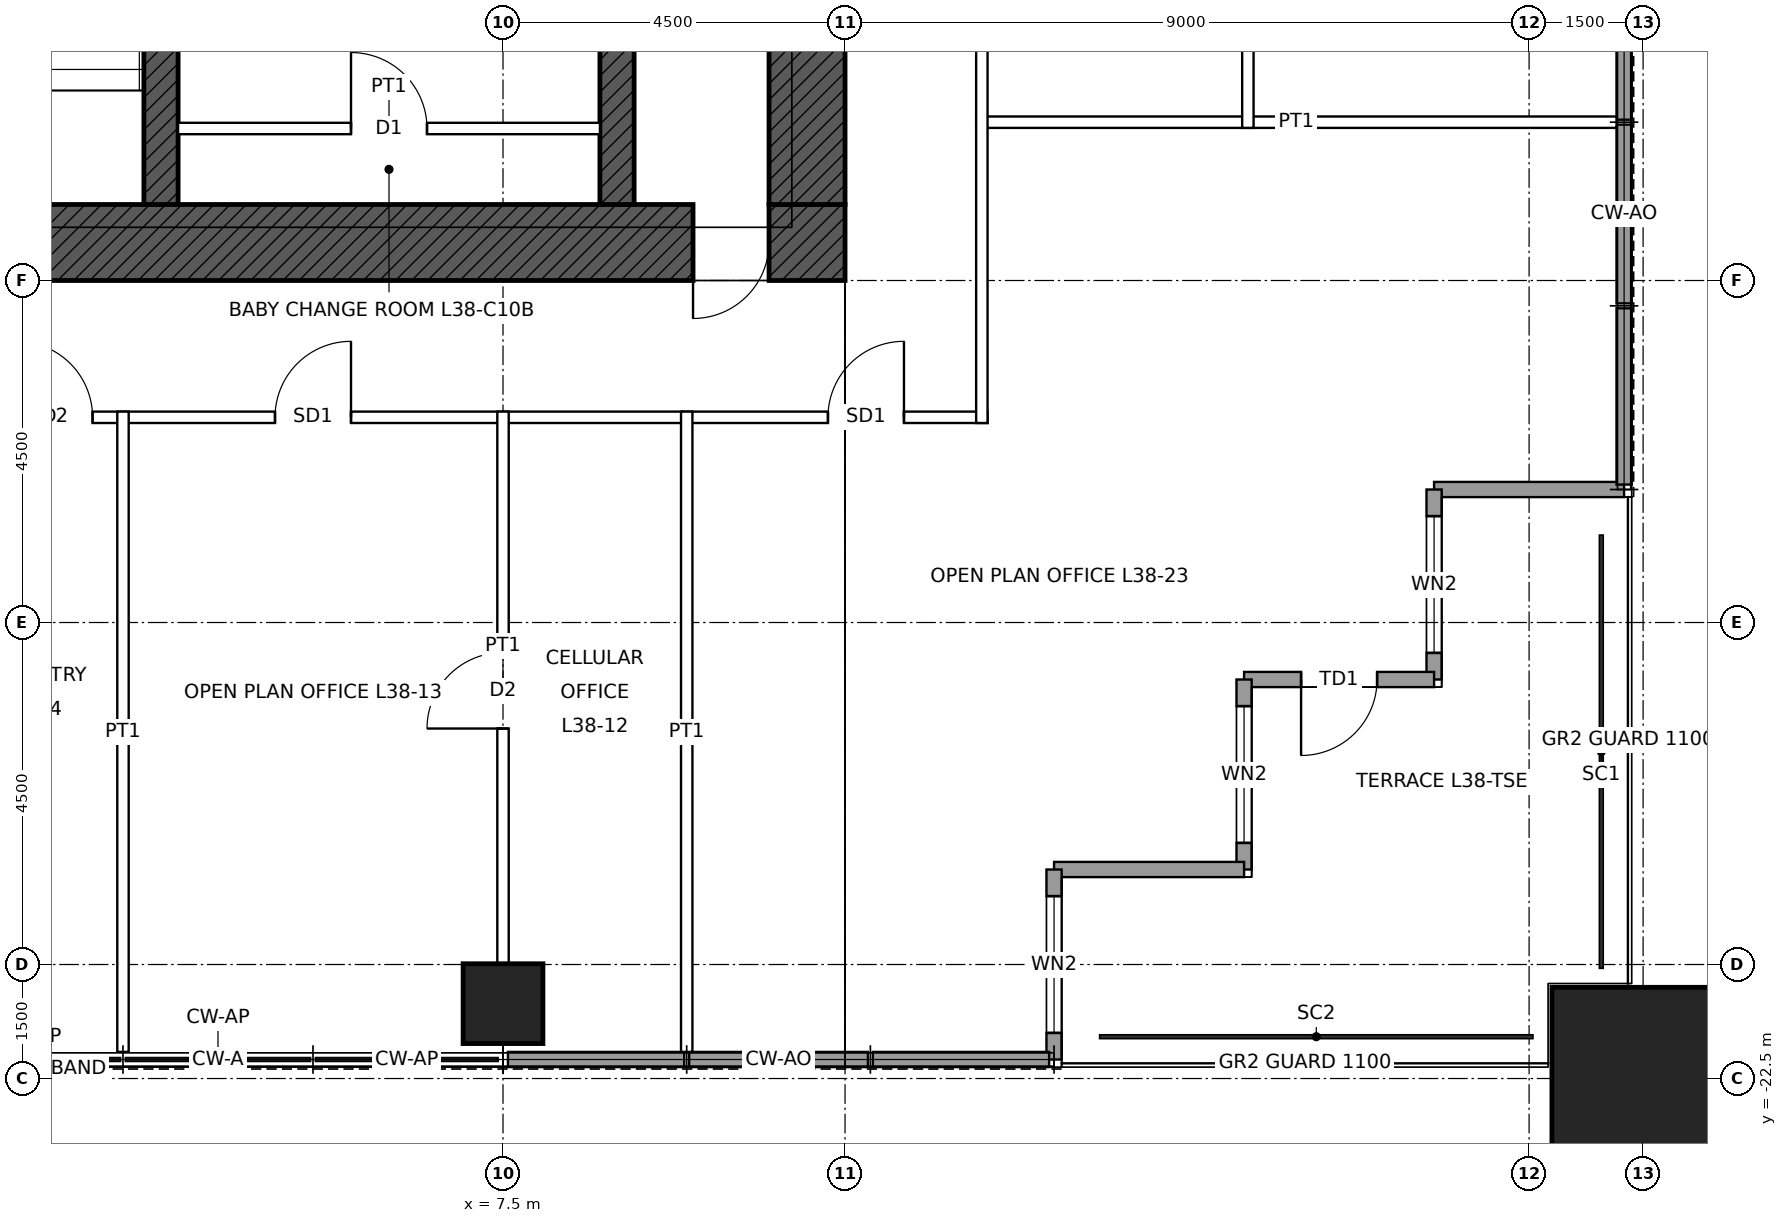
"""IFC4 building model, lengths in metres.
Left out: names, types, materials, properties, quantities, classifications, styles, units other than length and angle.
Written with IfcOpenShell. Run it as: python <this file> out.ifc"""

import sys

from ifc_helpers import new_model, si_unit, direction, frame, frame_2d, origin, origin_2d, place, context, subcontext, project, spatial, rectangle, hollow_rectangle, extrude, element, fill, save


model = new_model("IFC4")
c1 = context("Model", 3, precision=1e-05, world=origin(), true_north=direction((0.0, 1.0)))
c2 = subcontext(c1, "Body", "Model", "MODEL_VIEW")
j1 = project(units=[si_unit("LENGTHUNIT", "METRE"), si_unit("PLANEANGLEUNIT", "RADIAN")], contexts=[c1])
p1 = place(None, origin())
s1 = spatial("IfcSite", under=j1, at=p1, CompositionType="ELEMENT")
p2 = place(p1, origin())
s2 = spatial("IfcBuilding", under=s1, at=p2, CompositionType="ELEMENT")
p3 = place(p2, frame((0.0, 0.0, 185.9)))
s3 = spatial("IfcBuildingStorey", under=s2, at=p3, CompositionType="ELEMENT", Elevation=185.9)
p4 = place(p3, frame((22.5, -22.5, 0.0), z_axis=(0.0, 0.0, 1.0), x_axis=(1.0, 0.0, 0.0)))
e1 = element("IfcColumn", 1, at=p4, inside=s3, PredefinedType="COLUMN", context=c2, shape_type="SweptSolid", body=[
    extrude(hollow_rectangle(XDim=2.4, YDim=2.4, WallThickness=0.12, at=origin_2d()), origin(), (0.0, 0.0, 1.0), 4.0),
])
p5 = place(p3, frame((7.5, -21.515, 0.0), z_axis=(0.0, 0.0, 1.0), x_axis=(1.0, 0.0, 0.0)))
e2 = element("IfcColumn", 2, at=p5, inside=s3, PredefinedType="COLUMN", context=c2, shape_type="SweptSolid", body=[
    extrude(hollow_rectangle(XDim=1.05, YDim=1.05, WallThickness=0.07, at=origin_2d()), origin(), (0.0, 0.0, 1.0), 4.0),
])
p6 = place(p3, frame((12.0, -11.5, 0.0), z_axis=(0.0, 0.0, 1.0), x_axis=(-1.0, 0.0, 0.0)))
e3 = element("IfcWall", 3, at=p6, inside=s3, PredefinedType="SHEAR", context=c2, shape_type="SweptSolid", body=[
    extrude(rectangle(XDim=24.0, YDim=1.0, at=frame_2d((12.0, 0.0))), origin(), (0.0, 0.0, 1.0), 4.0),
])
p7 = place(p6, frame((11.5, 0.0, 0.0)))
e4 = element("IfcOpeningElement", 4, at=p7, cuts=e3, PredefinedType="OPENING", context=c2, shape_type="SweptSolid", body=[
    extrude(rectangle(XDim=1.0, YDim=2.1, at=frame_2d((0.5, 1.05))), frame((0.0, 0.51, 0.0), z_axis=(0.0, -1.0, 0.0), x_axis=(1.0, 0.0, 0.0)), (0.0, 0.0, 1.0), 1.02),
])
p8 = place(p6, frame((1.0, 0.0, 0.0)))
e5 = element("IfcOpeningElement", 5, at=p8, cuts=e3, PredefinedType="OPENING", context=c2, shape_type="SweptSolid", body=[
    extrude(rectangle(XDim=1.0, YDim=2.4, at=frame_2d((0.5, 1.2))), frame((0.0, 0.51, 0.0), z_axis=(0.0, -1.0, 0.0), x_axis=(1.0, 0.0, 0.0)), (0.0, 0.0, 1.0), 1.02),
])
p9 = place(p3, frame((11.5, 11.0, 0.0), z_axis=(0.0, 0.0, 1.0), x_axis=(0.0, -1.0, 0.0)))
e6 = element("IfcWall", 6, at=p9, inside=s3, PredefinedType="SHEAR", context=c2, shape_type="SweptSolid", body=[
    extrude(rectangle(XDim=22.0, YDim=1.0, at=frame_2d((11.0, 0.0))), origin(), (0.0, 0.0, 1.0), 4.0),
])
p10 = place(p9, frame((10.5, 0.0, 0.0)))
e7 = element("IfcOpeningElement", 7, at=p10, cuts=e6, PredefinedType="OPENING", context=c2, shape_type="SweptSolid", body=[
    extrude(rectangle(XDim=1.0, YDim=2.4, at=frame_2d((0.5, 1.2))), frame((0.0, 0.51, 0.0), z_axis=(0.0, -1.0, 0.0), x_axis=(1.0, 0.0, 0.0)), (0.0, 0.0, 1.0), 1.02),
])
p11 = place(p3, frame((9.0, -11.0, 0.0), z_axis=(0.0, 0.0, 1.0), x_axis=(0.0, 1.0, 0.0)))
e8 = element("IfcWall", 8, at=p11, inside=s3, PredefinedType="SHEAR", context=c2, shape_type="SweptSolid", body=[
    extrude(rectangle(XDim=6.5, YDim=0.45, at=frame_2d((3.25, 0.0))), origin(), (0.0, 0.0, 1.0), 4.0),
])
p12 = place(p11, frame((4.25, 0.0, 0.0)))
e9 = element("IfcOpeningElement", 9, at=p12, cuts=e8, PredefinedType="OPENING", context=c2, shape_type="SweptSolid", body=[
    extrude(rectangle(XDim=1.0, YDim=2.1, at=frame_2d((0.5, 1.05))), frame((0.0, 0.235, 0.0), z_axis=(0.0, -1.0, 0.0), x_axis=(1.0, 0.0, 0.0)), (0.0, 0.0, 1.0), 0.47),
])
p13 = place(p3, frame((3.0, -11.0, 0.0), z_axis=(0.0, 0.0, 1.0), x_axis=(0.0, 1.0, 0.0)))
e10 = element("IfcWall", 10, at=p13, inside=s3, PredefinedType="SHEAR", context=c2, shape_type="SweptSolid", body=[
    extrude(rectangle(XDim=6.5, YDim=0.45, at=frame_2d((3.25, 0.0))), origin(), (0.0, 0.0, 1.0), 4.0),
])
p14 = place(p3, frame((22.25, -14.75, 0.0), z_axis=(0.0, 0.0, 1.0), x_axis=(-1.0, 0.0, 0.0)))
e11 = element("IfcWall", 11, at=p14, inside=s3, PredefinedType="SOLIDWALL", context=c2, shape_type="SweptSolid", body=[
    extrude(rectangle(XDim=2.5, YDim=0.2, at=frame_2d((1.25, 0.0))), origin(), (0.0, 0.0, 1.0), 3.85),
])
p15 = place(p3, frame((19.75, -14.75, 0.0), z_axis=(0.0, 0.0, 1.0), x_axis=(0.0, -1.0, 0.0)))
e12 = element("IfcWall", 12, at=p15, inside=s3, PredefinedType="SOLIDWALL", context=c2, shape_type="SweptSolid", body=[
    extrude(rectangle(XDim=2.5, YDim=0.2, at=frame_2d((1.25, 0.0))), origin(), (0.0, 0.0, 1.0), 3.85),
])
p16 = place(p15, frame((0.35, 0.0, 0.3)))
e13 = element("IfcOpeningElement", 13, at=p16, cuts=e12, PredefinedType="OPENING", context=c2, shape_type="SweptSolid", body=[
    extrude(rectangle(XDim=1.8, YDim=2.4, at=frame_2d((0.9, 1.2))), frame((0.0, 0.11, 0.0), z_axis=(0.0, -1.0, 0.0), x_axis=(1.0, 0.0, 0.0)), (0.0, 0.0, 1.0), 0.22),
])
p17 = place(p3, frame((19.75, -17.25, 0.0), z_axis=(0.0, 0.0, 1.0), x_axis=(-1.0, 0.0, 0.0)))
e14 = element("IfcWall", 14, at=p17, inside=s3, PredefinedType="SOLIDWALL", context=c2, shape_type="SweptSolid", body=[
    extrude(rectangle(XDim=2.5, YDim=0.2, at=frame_2d((1.25, 0.0))), origin(), (0.0, 0.0, 1.0), 3.85),
])
p18 = place(p17, frame((0.75, 0.0, 0.0)))
e15 = element("IfcOpeningElement", 15, at=p18, cuts=e14, PredefinedType="OPENING", context=c2, shape_type="SweptSolid", body=[
    extrude(rectangle(XDim=1.0, YDim=2.4, at=frame_2d((0.5, 1.2))), frame((0.0, 0.11, 0.0), z_axis=(0.0, -1.0, 0.0), x_axis=(1.0, 0.0, 0.0)), (0.0, 0.0, 1.0), 0.22),
])
p19 = place(p3, frame((17.25, -17.25, 0.0), z_axis=(0.0, 0.0, 1.0), x_axis=(0.0, -1.0, 0.0)))
e16 = element("IfcWall", 16, at=p19, inside=s3, PredefinedType="SOLIDWALL", context=c2, shape_type="SweptSolid", body=[
    extrude(rectangle(XDim=2.5, YDim=0.2, at=frame_2d((1.25, 0.0))), origin(), (0.0, 0.0, 1.0), 3.85),
])
p20 = place(p19, frame((0.35, 0.0, 0.3)))
e17 = element("IfcOpeningElement", 17, at=p20, cuts=e16, PredefinedType="OPENING", context=c2, shape_type="SweptSolid", body=[
    extrude(rectangle(XDim=1.8, YDim=2.4, at=frame_2d((0.9, 1.2))), frame((0.0, 0.11, 0.0), z_axis=(0.0, -1.0, 0.0), x_axis=(1.0, 0.0, 0.0)), (0.0, 0.0, 1.0), 0.22),
])
p21 = place(p3, frame((17.25, -19.75, 0.0), z_axis=(0.0, 0.0, 1.0), x_axis=(-1.0, 0.0, 0.0)))
e18 = element("IfcWall", 18, at=p21, inside=s3, PredefinedType="SOLIDWALL", context=c2, shape_type="SweptSolid", body=[
    extrude(rectangle(XDim=2.5, YDim=0.2, at=frame_2d((1.25, 0.0))), origin(), (0.0, 0.0, 1.0), 3.85),
])
p22 = place(p3, frame((14.75, -19.75, 0.0), z_axis=(0.0, 0.0, 1.0), x_axis=(0.0, -1.0, 0.0)))
e19 = element("IfcWall", 19, at=p22, inside=s3, PredefinedType="SOLIDWALL", context=c2, shape_type="SweptSolid", body=[
    extrude(rectangle(XDim=2.5, YDim=0.2, at=frame_2d((1.25, 0.0))), origin(), (0.0, 0.0, 1.0), 3.85),
])
p23 = place(p22, frame((0.35, 0.0, 0.3)))
e20 = element("IfcOpeningElement", 20, at=p23, cuts=e19, PredefinedType="OPENING", context=c2, shape_type="SweptSolid", body=[
    extrude(rectangle(XDim=1.8, YDim=2.4, at=frame_2d((0.9, 1.2))), frame((0.0, 0.11, 0.0), z_axis=(0.0, -1.0, 0.0), x_axis=(1.0, 0.0, 0.0)), (0.0, 0.0, 1.0), 0.22),
])
p24 = place(p3, frame((22.25, -7.565, 0.0), z_axis=(0.0, 0.0, 1.0), x_axis=(0.0, -1.0, 0.0)))
e21 = element("IfcWall", 21, at=p24, inside=s3, PredefinedType="SOLIDWALL", context=c2, shape_type="SweptSolid", body=[
    extrude(rectangle(XDim=2.319, YDim=0.2, at=frame_2d((1.16, 0.0))), origin(), (0.0, 0.0, 1.0), 3.85),
])
p25 = place(p3, frame((22.25, -9.949, 0.0), z_axis=(0.0, 0.0, 1.0), x_axis=(0.0, -1.0, 0.0)))
e22 = element("IfcWall", 22, at=p25, inside=s3, PredefinedType="SOLIDWALL", context=c2, shape_type="SweptSolid", body=[
    extrude(rectangle(XDim=2.352, YDim=0.2, at=frame_2d((1.176, 0.0))), origin(), (0.0, 0.0, 1.0), 3.85),
])
for number, where, z_axis, x_axis in (
    (23, (22.25, -12.366, 0.0), (0.0, 0.0, 1.0), (0.0, -1.0, 0.0)),
    (24, (14.685, -22.25, 0.0), (0.0, 0.0, 1.0), (-1.0, 0.0, 0.0)),
):
    element("IfcWall", number, at=place(p3, frame(where, z_axis=z_axis, x_axis=x_axis)), inside=s3, PredefinedType="SOLIDWALL", context=c2, shape_type="SweptSolid", body=[
        extrude(rectangle(XDim=2.319, YDim=0.2, at=frame_2d((1.16, 0.0))), origin(), (0.0, 0.0, 1.0), 3.85),
    ])
p26 = place(p3, frame((12.301, -22.25, 0.0), z_axis=(0.0, 0.0, 1.0), x_axis=(-1.0, 0.0, 0.0)))
e25 = element("IfcWall", 25, at=p26, inside=s3, PredefinedType="SOLIDWALL", context=c2, shape_type="SweptSolid", body=[
    extrude(rectangle(XDim=2.352, YDim=0.2, at=frame_2d((1.176, 0.0))), origin(), (0.0, 0.0, 1.0), 3.85),
])
p27 = place(p3, frame((9.884, -22.25, 0.0), z_axis=(0.0, 0.0, 1.0), x_axis=(-1.0, 0.0, 0.0)))
e26 = element("IfcWall", 26, at=p27, inside=s3, PredefinedType="SOLIDWALL", context=c2, shape_type="SweptSolid", body=[
    extrude(rectangle(XDim=2.319, YDim=0.2, at=frame_2d((1.16, 0.0))), origin(), (0.0, 0.0, 1.0), 3.85),
])
p28 = place(p3, frame((-13.875, -13.8, 0.0), z_axis=(0.0, 0.0, 1.0), x_axis=(1.0, 0.0, 0.0)))
e27 = element("IfcWall", 27, at=p28, inside=s3, PredefinedType="PARTITIONING", context=c2, shape_type="SweptSolid", body=[
    extrude(rectangle(XDim=27.75, YDim=0.15, at=frame_2d((13.875, 0.0))), origin(), (0.0, 0.0, 1.0), 3.85),
])
p29 = place(p28, frame((18.375, 0.0, 0.0)))
e28 = element("IfcOpeningElement", 28, at=p29, cuts=e27, PredefinedType="OPENING", context=c2, shape_type="SweptSolid", body=[
    extrude(rectangle(XDim=1.0, YDim=2.4, at=frame_2d((0.5, 1.2))), frame((0.0, 0.085, 0.0), z_axis=(0.0, -1.0, 0.0), x_axis=(1.0, 0.0, 0.0)), (0.0, 0.0, 1.0), 0.17),
])
p30 = place(p28, frame((14.975, 0.0, 0.0)))
e29 = element("IfcOpeningElement", 29, at=p30, cuts=e27, PredefinedType="OPENING", context=c2, shape_type="SweptSolid", body=[
    extrude(rectangle(XDim=1.0, YDim=2.1, at=frame_2d((0.5, 1.05))), frame((0.0, 0.085, 0.0), z_axis=(0.0, -1.0, 0.0), x_axis=(1.0, 0.0, 0.0)), (0.0, 0.0, 1.0), 0.17),
])
p31 = place(p28, frame((11.775, 0.0, 0.0)))
e30 = element("IfcOpeningElement", 30, at=p31, cuts=e27, PredefinedType="OPENING", context=c2, shape_type="SweptSolid", body=[
    extrude(rectangle(XDim=1.0, YDim=2.1, at=frame_2d((0.5, 1.05))), frame((0.0, 0.085, 0.0), z_axis=(0.0, -1.0, 0.0), x_axis=(1.0, 0.0, 0.0)), (0.0, 0.0, 1.0), 0.17),
])
p32 = place(p28, frame((8.375, 0.0, 0.0)))
e31 = element("IfcOpeningElement", 31, at=p32, cuts=e27, PredefinedType="OPENING", context=c2, shape_type="SweptSolid", body=[
    extrude(rectangle(XDim=1.0, YDim=2.4, at=frame_2d((0.5, 1.2))), frame((0.0, 0.085, 0.0), z_axis=(0.0, -1.0, 0.0), x_axis=(1.0, 0.0, 0.0)), (0.0, 0.0, 1.0), 0.17),
])
p33 = place(p28, frame((25.65, 0.0, 0.0)))
e32 = element("IfcOpeningElement", 32, at=p33, cuts=e27, PredefinedType="OPENING", context=c2, shape_type="SweptSolid", body=[
    extrude(rectangle(XDim=1.0, YDim=2.4, at=frame_2d((0.5, 1.2))), frame((0.0, 0.085, 0.0), z_axis=(0.0, -1.0, 0.0), x_axis=(1.0, 0.0, 0.0)), (0.0, 0.0, 1.0), 0.17),
])
p34 = place(p28, frame((1.517, 0.0, 0.0)))
e33 = element("IfcOpeningElement", 33, at=p34, cuts=e27, PredefinedType="OPENING", context=c2, shape_type="SweptSolid", body=[
    extrude(rectangle(XDim=1.0, YDim=2.4, at=frame_2d((0.5, 1.2))), frame((0.0, 0.085, 0.0), z_axis=(0.0, -1.0, 0.0), x_axis=(1.0, 0.0, 0.0)), (0.0, 0.0, 1.0), 0.17),
])
for number, where, z_axis, x_axis in (
    (34, (13.725, -9.917, 0.0), (0.0, 0.0, 1.0), (1.0, 0.0, 0.0)),
    (35, (2.5, -22.15, 0.0), (0.0, 0.0, 1.0), (0.0, 1.0, 0.0)),
):
    element("IfcWall", number, at=place(p3, frame(where, z_axis=z_axis, x_axis=x_axis)), inside=s3, PredefinedType="PARTITIONING", context=c2, shape_type="SweptSolid", body=[
        extrude(rectangle(XDim=8.425, YDim=0.15, at=frame_2d((4.212, 0.0))), origin(), (0.0, 0.0, 1.0), 3.85),
    ])
p35 = place(p3, frame((7.5, -20.99, 0.0), z_axis=(0.0, 0.0, 1.0), x_axis=(0.0, 1.0, 0.0)))
e36 = element("IfcWall", 36, at=p35, inside=s3, PredefinedType="PARTITIONING", context=c2, shape_type="SweptSolid", body=[
    extrude(rectangle(XDim=7.265, YDim=0.15, at=frame_2d((3.632, 0.0))), origin(), (0.0, 0.0, 1.0), 3.238),
])
p36 = place(p35, frame((3.095, 0.0, 0.0)))
e37 = element("IfcOpeningElement", 37, at=p36, cuts=e36, PredefinedType="OPENING", context=c2, shape_type="SweptSolid", body=[
    extrude(rectangle(XDim=1.0, YDim=2.1, at=frame_2d((0.5, 1.05))), frame((0.0, 0.085, 0.0), z_axis=(0.0, -1.0, 0.0), x_axis=(1.0, 0.0, 0.0)), (0.0, 0.0, 1.0), 0.17),
])
p37 = place(p3, frame((9.917, -22.15, 0.0), z_axis=(0.0, 0.0, 1.0), x_axis=(0.0, 1.0, 0.0)))
e38 = element("IfcWall", 38, at=p37, inside=s3, PredefinedType="PARTITIONING", context=c2, shape_type="SweptSolid", body=[
    extrude(rectangle(XDim=8.425, YDim=0.15, at=frame_2d((4.212, 0.0))), origin(), (0.0, 0.0, 1.0), 3.85),
])
p38 = place(p3, frame((13.8, -13.875, 0.0), z_axis=(0.0, 0.0, 1.0), x_axis=(0.0, 1.0, 0.0)))
e39 = element("IfcWall", 39, at=p38, inside=s3, PredefinedType="PARTITIONING", context=c2, shape_type="SweptSolid", body=[
    extrude(rectangle(XDim=18.95, YDim=0.15, at=frame_2d((9.475, 0.0))), origin(), (0.0, 0.0, 1.0), 3.85),
])
p39 = place(p38, frame((15.875, 0.0, 0.0)))
e40 = element("IfcOpeningElement", 40, at=p39, cuts=e39, PredefinedType="OPENING", context=c2, shape_type="SweptSolid", body=[
    extrude(rectangle(XDim=1.0, YDim=2.4, at=frame_2d((0.5, 1.2))), frame((0.0, 0.085, 0.0), z_axis=(0.0, -1.0, 0.0), x_axis=(1.0, 0.0, 0.0)), (0.0, 0.0, 1.0), 0.17),
])
p40 = place(p38, frame((10.875, 0.0, 0.0)))
e41 = element("IfcOpeningElement", 41, at=p40, cuts=e39, PredefinedType="OPENING", context=c2, shape_type="SweptSolid", body=[
    extrude(rectangle(XDim=1.0, YDim=2.4, at=frame_2d((0.5, 1.2))), frame((0.0, 0.085, 0.0), z_axis=(0.0, -1.0, 0.0), x_axis=(1.0, 0.0, 0.0)), (0.0, 0.0, 1.0), 0.17),
])
p41 = place(p3, frame((17.3, -9.992, 0.0), z_axis=(0.0, 0.0, 1.0), x_axis=(0.0, 1.0, 0.0)))
e42 = element("IfcWall", 42, at=p41, inside=s3, PredefinedType="PARTITIONING", context=c2, shape_type="SweptSolid", body=[
    extrude(rectangle(XDim=5.067, YDim=0.15, at=frame_2d((2.533, 0.0))), origin(), (0.0, 0.0, 1.0), 3.85),
])
p42 = place(p41, frame((2.033, 0.0, 0.0)))
e43 = element("IfcOpeningElement", 43, at=p42, cuts=e42, PredefinedType="OPENING", context=c2, shape_type="SweptSolid", body=[
    extrude(rectangle(XDim=1.0, YDim=2.1, at=frame_2d((0.5, 1.05))), frame((0.0, 0.085, 0.0), z_axis=(0.0, -1.0, 0.0), x_axis=(1.0, 0.0, 0.0)), (0.0, 0.0, 1.0), 0.17),
])
p43 = place(p3, frame((3.225, -10.0, 0.0), z_axis=(0.0, 0.0, 1.0), x_axis=(1.0, 0.0, 0.0)))
e44 = element("IfcWall", 44, at=p43, inside=s3, PredefinedType="PARTITIONING", context=c2, shape_type="SweptSolid", body=[
    extrude(rectangle(XDim=5.55, YDim=0.15, at=frame_2d((2.775, 0.0))), origin(), (0.0, 0.0, 1.0), 3.75),
])
p44 = place(p43, frame((2.275, 0.0, 0.0)))
e45 = element("IfcOpeningElement", 45, at=p44, cuts=e44, PredefinedType="OPENING", context=c2, shape_type="SweptSolid", body=[
    extrude(rectangle(XDim=1.0, YDim=2.1, at=frame_2d((0.5, 1.05))), frame((0.0, 0.085, 0.0), z_axis=(0.0, -1.0, 0.0), x_axis=(1.0, 0.0, 0.0)), (0.0, 0.0, 1.0), 0.17),
])
p45 = place(p16, origin())
e46 = element("IfcWindow", 46, at=p45, inside=s3, PartitioningType="SINGLE_PANEL", PredefinedType="WINDOW", context=c2, shape_type="SweptSolid", body=[
    extrude(rectangle(XDim=1.8, YDim=2.4, at=frame_2d((0.9, 1.2))), frame((0.0, 0.03, 0.0), z_axis=(0.0, -1.0, 0.0), x_axis=(1.0, 0.0, 0.0)), (0.0, 0.0, 1.0), 0.06),
])
fill(e13, e46)
p46 = place(p18, origin())
e47 = element("IfcDoor", 47, at=p46, inside=s3, OperationType="SINGLE_SWING_RIGHT", PredefinedType="DOOR", context=c2, shape_type="SweptSolid", body=[
    extrude(rectangle(XDim=1.0, YDim=2.4, at=frame_2d((0.5, 1.2))), frame((0.0, 0.025, 0.0), z_axis=(0.0, -1.0, 0.0), x_axis=(1.0, 0.0, 0.0)), (0.0, 0.0, 1.0), 0.05),
])
fill(e15, e47)
p47 = place(p20, origin())
e48 = element("IfcWindow", 48, at=p47, inside=s3, PartitioningType="SINGLE_PANEL", PredefinedType="WINDOW", context=c2, shape_type="SweptSolid", body=[
    extrude(rectangle(XDim=1.8, YDim=2.4, at=frame_2d((0.9, 1.2))), frame((0.0, 0.03, 0.0), z_axis=(0.0, -1.0, 0.0), x_axis=(1.0, 0.0, 0.0)), (0.0, 0.0, 1.0), 0.06),
])
fill(e17, e48)
p48 = place(p23, origin())
e49 = element("IfcWindow", 49, at=p48, inside=s3, PartitioningType="SINGLE_PANEL", PredefinedType="WINDOW", context=c2, shape_type="SweptSolid", body=[
    extrude(rectangle(XDim=1.8, YDim=2.4, at=frame_2d((0.9, 1.2))), frame((0.0, 0.03, 0.0), z_axis=(0.0, -1.0, 0.0), x_axis=(1.0, 0.0, 0.0)), (0.0, 0.0, 1.0), 0.06),
])
fill(e20, e49)
p49 = place(p8, origin())
e50 = element("IfcDoor", 50, at=p49, inside=s3, OperationType="SINGLE_SWING_RIGHT", PredefinedType="DOOR", context=c2, shape_type="SweptSolid", body=[
    extrude(rectangle(XDim=1.0, YDim=2.4, at=frame_2d((0.5, 1.2))), frame((0.0, 0.485, 0.0), z_axis=(0.0, -1.0, 0.0), x_axis=(1.0, 0.0, 0.0)), (0.0, 0.0, 1.0), 0.05),
])
fill(e5, e50)
p50 = place(p44, origin())
e51 = element("IfcDoor", 51, at=p50, inside=s3, OperationType="SINGLE_SWING_LEFT", PredefinedType="DOOR", context=c2, shape_type="SweptSolid", body=[
    extrude(rectangle(XDim=1.0, YDim=2.1, at=frame_2d((0.5, 1.05))), frame((0.0, 0.025, 0.0), z_axis=(0.0, -1.0, 0.0), x_axis=(1.0, 0.0, 0.0)), (0.0, 0.0, 1.0), 0.05),
])
fill(e45, e51)
p51 = place(p36, origin())
e52 = element("IfcDoor", 52, at=p51, inside=s3, OperationType="SINGLE_SWING_LEFT", PredefinedType="DOOR", context=c2, shape_type="SweptSolid", body=[
    extrude(rectangle(XDim=1.0, YDim=2.1, at=frame_2d((0.5, 1.05))), frame((0.0, 0.025, 0.0), z_axis=(0.0, -1.0, 0.0), x_axis=(1.0, 0.0, 0.0)), (0.0, 0.0, 1.0), 0.05),
])
fill(e37, e52)
p52 = place(p29, origin())
e53 = element("IfcDoor", 53, at=p52, inside=s3, OperationType="SINGLE_SWING_RIGHT", PredefinedType="DOOR", context=c2, shape_type="SweptSolid", body=[
    extrude(rectangle(XDim=1.0, YDim=2.4, at=frame_2d((0.5, 1.2))), frame((0.0, 0.025, 0.0), z_axis=(0.0, -1.0, 0.0), x_axis=(1.0, 0.0, 0.0)), (0.0, 0.0, 1.0), 0.05),
])
fill(e28, e53)
p53 = place(p30, origin())
e54 = element("IfcDoor", 54, at=p53, inside=s3, OperationType="SINGLE_SWING_LEFT", PredefinedType="DOOR", context=c2, shape_type="SweptSolid", body=[
    extrude(rectangle(XDim=1.0, YDim=2.1, at=frame_2d((0.5, 1.05))), frame((0.0, 0.025, 0.0), z_axis=(0.0, -1.0, 0.0), x_axis=(1.0, 0.0, 0.0)), (0.0, 0.0, 1.0), 0.05),
])
fill(e29, e54)
p54 = place(p33, origin())
e55 = element("IfcDoor", 55, at=p54, inside=s3, OperationType="SINGLE_SWING_RIGHT", PredefinedType="DOOR", context=c2, shape_type="SweptSolid", body=[
    extrude(rectangle(XDim=1.0, YDim=2.4, at=frame_2d((0.5, 1.2))), frame((0.0, 0.025, 0.0), z_axis=(0.0, -1.0, 0.0), x_axis=(1.0, 0.0, 0.0)), (0.0, 0.0, 1.0), 0.05),
])
fill(e32, e55)
save(model, sys.argv[1])
